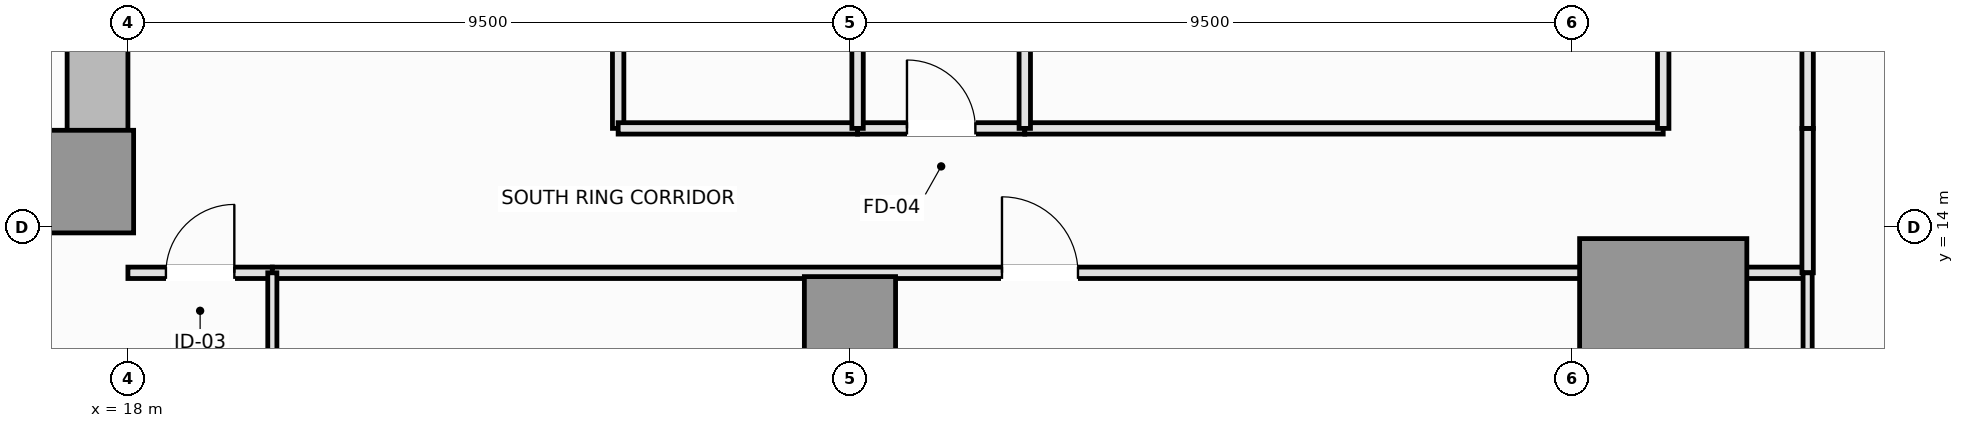
"""IFC4 building model, lengths in metres.
Left out: names, types, materials, properties, quantities, classifications, styles, units other than length and angle.
Written with IfcOpenShell. Run it as: python <this file> out.ifc"""

import sys

from ifc_helpers import new_model, si_unit, direction, frame, frame_2d, origin, origin_2d, place, context, subcontext, project, spatial, rectangle, extrude, element, fill, save


model = new_model("IFC4")
c1 = context("Model", 3, precision=1e-05, world=origin(), true_north=direction((0.0, 1.0)))
c2 = subcontext(c1, "Body", "Model", "MODEL_VIEW")
j1 = project(units=[si_unit("LENGTHUNIT", "METRE"), si_unit("PLANEANGLEUNIT", "RADIAN")], contexts=[c1])
p1 = place(None, origin())
s1 = spatial("IfcSite", under=j1, at=p1, CompositionType="ELEMENT")
p2 = place(p1, origin())
s2 = spatial("IfcBuilding", under=s1, at=p2, CompositionType="ELEMENT")
p3 = place(p2, frame((0.0, 0.0, 54.0)))
s3 = spatial("IfcBuildingStorey", under=s2, at=p3, CompositionType="ELEMENT", Elevation=54.0)
p4 = place(p3, frame((4.5, 14.4, 0.0), z_axis=(0.0, 0.0, 1.0), x_axis=(1.0, 0.0, 0.0)))
e1 = element("IfcWall", 1, at=p4, inside=s3, PredefinedType="SHEAR", context=c2, shape_type="SweptSolid", body=[
    extrude(rectangle(XDim=13.5, YDim=0.8, at=frame_2d((6.75, 0.0))), origin(), (0.0, 0.0, 1.0), 3.55),
])
p5 = place(p3, frame((17.6, 14.8, 0.0), z_axis=(0.0, 0.0, 1.0), x_axis=(0.0, 1.0, 0.0)))
e2 = element("IfcWall", 2, at=p5, inside=s3, PredefinedType="SHEAR", context=c2, shape_type="SweptSolid", body=[
    extrude(rectangle(XDim=8.65, YDim=0.8, at=frame_2d((4.325, 0.0))), origin(), (0.0, 0.0, 1.0), 3.55),
])
p6 = place(p5, frame((4.1, 0.0, 0.0)))
e3 = element("IfcOpeningElement", 3, at=p6, cuts=e2, PredefinedType="OPENING", context=c2, shape_type="SweptSolid", body=[
    extrude(rectangle(XDim=1.1, YDim=2.15, at=frame_2d((0.55, 1.075))), frame((0.0, 0.41, 0.0), z_axis=(0.0, -1.0, 0.0), x_axis=(1.0, 0.0, 0.0)), (0.0, 0.0, 1.0), 0.82),
])
p7 = place(p3, frame((17.4, 14.6, 0.0), z_axis=(0.0, 0.0, 1.0), x_axis=(1.0, 0.0, 0.0)))
e4 = element("IfcColumn", 4, at=p7, inside=s3, PredefinedType="PILASTER", context=c2, shape_type="SweptSolid", body=[
    extrude(rectangle(XDim=1.35, YDim=1.35, at=origin_2d()), origin(), (0.0, 0.0, 1.0), 3.55),
])
p8 = place(p3, frame((38.2, 12.75, 0.0), z_axis=(0.0, 0.0, 1.0), x_axis=(1.0, 0.0, 0.0)))
e5 = element("IfcColumn", 5, at=p8, inside=s3, PredefinedType="COLUMN", context=c2, shape_type="SweptSolid", body=[
    extrude(rectangle(XDim=2.2, YDim=2.2, at=origin_2d()), origin(), (0.0, 0.0, 1.0), 3.55),
])
p9 = place(p3, frame((27.5, 12.75, 0.0), z_axis=(0.0, 0.0, 1.0), x_axis=(1.0, 0.0, 0.0)))
e6 = element("IfcColumn", 6, at=p9, inside=s3, PredefinedType="COLUMN", context=c2, shape_type="SweptSolid", body=[
    extrude(rectangle(XDim=1.2, YDim=1.2, at=origin_2d()), origin(), (0.0, 0.0, 1.0), 3.55),
])
p10 = place(p3, frame((24.45, 15.3, 0.0), z_axis=(0.0, 0.0, 1.0), x_axis=(0.0, 1.0, 0.0)))
e7 = element("IfcWall", 7, at=p10, inside=s3, PredefinedType="PLUMBINGWALL", context=c2, shape_type="SweptSolid", body=[
    extrude(rectangle(XDim=3.1, YDim=0.15, at=frame_2d((1.55, 0.0))), origin(), (0.0, 0.0, 1.0), 3.37),
])
p11 = place(p10, frame((1.1, 0.0, 0.0)))
e8 = element("IfcOpeningElement", 8, at=p11, cuts=e7, PredefinedType="OPENING", context=c2, shape_type="SweptSolid", body=[
    extrude(rectangle(XDim=0.9, YDim=2.1, at=frame_2d((0.45, 1.05))), frame((0.0, 0.085, 0.0), z_axis=(0.0, -1.0, 0.0), x_axis=(1.0, 0.0, 0.0)), (0.0, 0.0, 1.0), 0.17),
])
p12 = place(p3, frame((24.45, 15.3, 0.0), z_axis=(0.0, 0.0, 1.0), x_axis=(1.0, 0.0, 0.0)))
e9 = element("IfcWall", 9, at=p12, inside=s3, PredefinedType="PLUMBINGWALL", context=c2, shape_type="SweptSolid", body=[
    extrude(rectangle(XDim=3.15, YDim=0.15, at=frame_2d((1.575, 0.0))), origin(), (0.0, 0.0, 1.0), 3.37),
])
p13 = place(p3, frame((27.6, 15.3, 0.0), z_axis=(0.0, 0.0, 1.0), x_axis=(1.0, 0.0, 0.0)))
e10 = element("IfcWall", 10, at=p13, inside=s3, PredefinedType="PLUMBINGWALL", context=c2, shape_type="SweptSolid", body=[
    extrude(rectangle(XDim=2.2, YDim=0.15, at=frame_2d((1.1, 0.0))), origin(), (0.0, 0.0, 1.0), 3.37),
])
p14 = place(p13, frame((0.65, 0.0, 0.0)))
e11 = element("IfcOpeningElement", 11, at=p14, cuts=e10, PredefinedType="OPENING", context=c2, shape_type="SweptSolid", body=[
    extrude(rectangle(XDim=0.9, YDim=2.1, at=frame_2d((0.45, 1.05))), frame((0.0, 0.085, 0.0), z_axis=(0.0, -1.0, 0.0), x_axis=(1.0, 0.0, 0.0)), (0.0, 0.0, 1.0), 0.17),
])
p15 = place(p3, frame((29.8, 15.3, 0.0), z_axis=(0.0, 0.0, 1.0), x_axis=(1.0, 0.0, 0.0)))
e12 = element("IfcWall", 12, at=p15, inside=s3, PredefinedType="PARTITIONING", context=c2, shape_type="SweptSolid", body=[
    extrude(rectangle(XDim=8.4, YDim=0.15, at=frame_2d((4.2, 0.0))), origin(), (0.0, 0.0, 1.0), 3.37),
])
p16 = place(p3, frame((18.0, 13.4, 0.0), z_axis=(0.0, 0.0, 1.0), x_axis=(1.0, 0.0, 0.0)))
e13 = element("IfcWall", 13, at=p16, inside=s3, PredefinedType="PARTITIONING", context=c2, shape_type="SweptSolid", body=[
    extrude(rectangle(XDim=1.9, YDim=0.15, at=frame_2d((0.95, 0.0))), origin(), (0.0, 0.0, 1.0), 3.37),
])
p17 = place(p16, frame((0.5, 0.0, 0.0)))
e14 = element("IfcOpeningElement", 14, at=p17, cuts=e13, PredefinedType="OPENING", context=c2, shape_type="SweptSolid", body=[
    extrude(rectangle(XDim=0.9, YDim=2.1, at=frame_2d((0.45, 1.05))), frame((0.0, 0.085, 0.0), z_axis=(0.0, -1.0, 0.0), x_axis=(1.0, 0.0, 0.0)), (0.0, 0.0, 1.0), 0.17),
])
p18 = place(p3, frame((19.9, 13.4, 0.0), z_axis=(0.0, 0.0, 1.0), x_axis=(1.0, 0.0, 0.0)))
e15 = element("IfcWall", 15, at=p18, inside=s3, PredefinedType="PARTITIONING", context=c2, shape_type="SweptSolid", body=[
    extrude(rectangle(XDim=20.2, YDim=0.15, at=frame_2d((10.1, 0.0))), origin(), (0.0, 0.0, 1.0), 3.37),
])
p19 = place(p18, frame((9.6, 0.0, 0.0)))
e16 = element("IfcOpeningElement", 16, at=p19, cuts=e15, PredefinedType="OPENING", context=c2, shape_type="SweptSolid", body=[
    extrude(rectangle(XDim=1.0, YDim=2.15, at=frame_2d((0.5, 1.075))), frame((0.0, 0.085, 0.0), z_axis=(0.0, -1.0, 0.0), x_axis=(1.0, 0.0, 0.0)), (0.0, 0.0, 1.0), 0.17),
])
p20 = place(p3, frame((40.1, 13.4, 0.0), z_axis=(0.0, 0.0, 1.0), x_axis=(0.0, 1.0, 0.0)))
e17 = element("IfcWall", 17, at=p20, inside=s3, PredefinedType="PARTITIONING", context=c2, shape_type="SweptSolid", body=[
    extrude(rectangle(XDim=1.9, YDim=0.15, at=frame_2d((0.95, 0.0))), origin(), (0.0, 0.0, 1.0), 3.37),
])
p21 = place(p3, frame((38.2, 15.3, 0.0), z_axis=(0.0, 0.0, 1.0), x_axis=(0.0, 1.0, 0.0)))
e18 = element("IfcWall", 18, at=p21, inside=s3, PredefinedType="PARTITIONING", context=c2, shape_type="SweptSolid", body=[
    extrude(rectangle(XDim=3.1, YDim=0.15, at=frame_2d((1.55, 0.0))), origin(), (0.0, 0.0, 1.0), 2.82),
])
p22 = place(p21, frame((1.05, 0.0, 0.0)))
e19 = element("IfcOpeningElement", 19, at=p22, cuts=e18, PredefinedType="OPENING", context=c2, shape_type="SweptSolid", body=[
    extrude(rectangle(XDim=1.0, YDim=2.15, at=frame_2d((0.5, 1.075))), frame((0.0, 0.085, 0.0), z_axis=(0.0, -1.0, 0.0), x_axis=(1.0, 0.0, 0.0)), (0.0, 0.0, 1.0), 0.17),
])
p23 = place(p3, frame((40.1, 15.3, 0.0), z_axis=(0.0, 0.0, 1.0), x_axis=(0.0, 1.0, 0.0)))
e20 = element("IfcWall", 20, at=p23, inside=s3, PredefinedType="PARTITIONING", context=c2, shape_type="SweptSolid", body=[
    extrude(rectangle(XDim=3.2, YDim=0.15, at=frame_2d((1.6, 0.0))), origin(), (0.0, 0.0, 1.0), 3.37),
])
p24 = place(p23, frame((1.1, 0.0, 0.0)))
e21 = element("IfcOpeningElement", 21, at=p24, cuts=e20, PredefinedType="OPENING", context=c2, shape_type="SweptSolid", body=[
    extrude(rectangle(XDim=1.0, YDim=2.15, at=frame_2d((0.5, 1.075))), frame((0.0, 0.085, 0.0), z_axis=(0.0, -1.0, 0.0), x_axis=(1.0, 0.0, 0.0)), (0.0, 0.0, 1.0), 0.17),
])
for number, where, z_axis, x_axis in (
    (22, (27.6, 15.3, 0.0), (0.0, 0.0, 1.0), (0.0, 1.0, 0.0)),
    (23, (29.8, 15.3, 0.0), (0.0, 0.0, 1.0), (0.0, 1.0, 0.0)),
):
    element("IfcWall", number, at=place(p3, frame(where, z_axis=z_axis, x_axis=x_axis)), inside=s3, PredefinedType="PLUMBINGWALL", context=c2, shape_type="SweptSolid", body=[
        extrude(rectangle(XDim=3.1, YDim=0.15, at=frame_2d((1.55, 0.0))), origin(), (0.0, 0.0, 1.0), 3.37),
    ])
for number, where, z_axis, x_axis in (
    (24, (19.9, 2.51, 0.0), (0.0, 0.0, 1.0), (0.0, 1.0, 0.0)),
    (25, (40.1, 2.51, 0.0), (0.0, 0.0, 1.0), (0.0, 1.0, 0.0)),
):
    element("IfcWall", number, at=place(p3, frame(where, z_axis=z_axis, x_axis=x_axis)), inside=s3, PredefinedType="PARTITIONING", context=c2, shape_type="SweptSolid", body=[
        extrude(rectangle(XDim=10.89, YDim=0.12, at=frame_2d((5.445, 0.0))), origin(), (0.0, 0.0, 1.0), 3.37),
    ])
p25 = place(p14, origin())
e26 = element("IfcDoor", 26, at=p25, inside=s3, OperationType="SINGLE_SWING_LEFT", PredefinedType="DOOR", context=c2, shape_type="SweptSolid", body=[
    extrude(rectangle(XDim=0.9, YDim=2.1, at=frame_2d((0.45, 1.05))), frame((0.0, 0.025, 0.0), z_axis=(0.0, -1.0, 0.0), x_axis=(1.0, 0.0, 0.0)), (0.0, 0.0, 1.0), 0.05),
])
fill(e11, e26)
p26 = place(p17, origin())
e27 = element("IfcDoor", 27, at=p26, inside=s3, OperationType="SINGLE_SWING_RIGHT", PredefinedType="DOOR", context=c2, shape_type="SweptSolid", body=[
    extrude(rectangle(XDim=0.9, YDim=2.1, at=frame_2d((0.45, 1.05))), frame((0.0, 0.025, 0.0), z_axis=(0.0, -1.0, 0.0), x_axis=(1.0, 0.0, 0.0)), (0.0, 0.0, 1.0), 0.05),
])
fill(e14, e27)
p27 = place(p19, origin())
e28 = element("IfcDoor", 28, at=p27, inside=s3, OperationType="SINGLE_SWING_LEFT", PredefinedType="DOOR", context=c2, shape_type="SweptSolid", body=[
    extrude(rectangle(XDim=1.0, YDim=2.15, at=frame_2d((0.5, 1.075))), frame((0.0, 0.025, 0.0), z_axis=(0.0, -1.0, 0.0), x_axis=(1.0, 0.0, 0.0)), (0.0, 0.0, 1.0), 0.05),
])
fill(e16, e28)
save(model, sys.argv[1])
